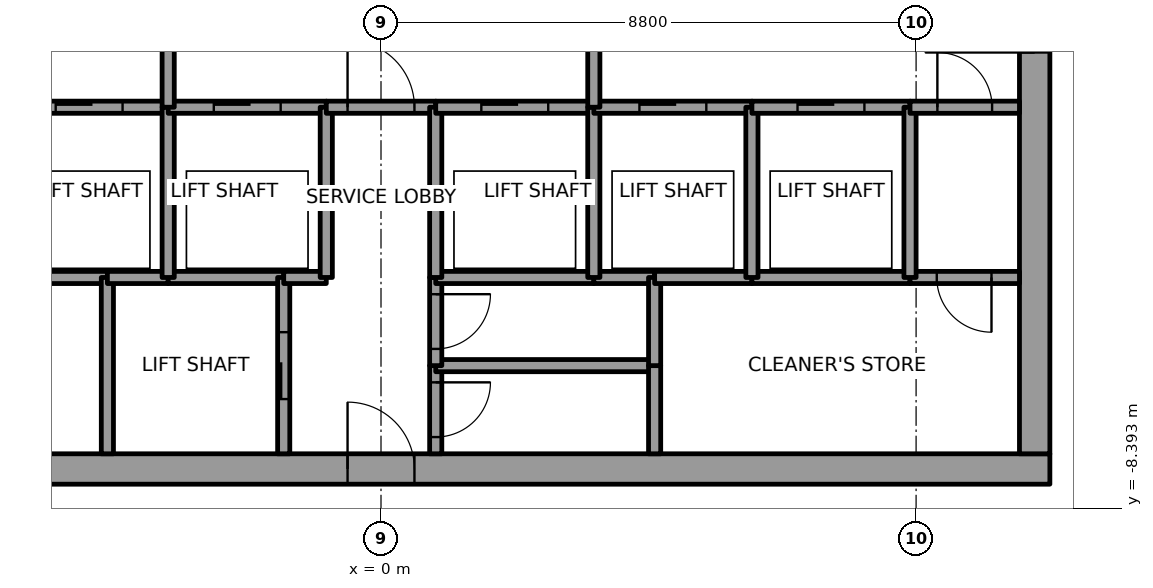
"""IFC4 building model, lengths in metres.
Left out: names, types, materials, properties, quantities, classifications, styles, units other than length and angle.
Written with IfcOpenShell. Run it as: python <this file> out.ifc"""

import sys

from ifc_helpers import new_model, si_unit, direction, frame, frame_2d, origin, place, context, subcontext, project, spatial, rectangle, extrude, element, fill, save


model = new_model("IFC4")
c1 = context("Model", 3, precision=1e-05, world=origin(), true_north=direction((0.0, 1.0)))
c2 = subcontext(c1, "Body", "Model", "MODEL_VIEW")
j1 = project(units=[si_unit("LENGTHUNIT", "METRE"), si_unit("PLANEANGLEUNIT", "RADIAN")], contexts=[c1])
p1 = place(None, origin())
s1 = spatial("IfcSite", under=j1, at=p1, CompositionType="ELEMENT")
p2 = place(p1, origin())
s2 = spatial("IfcBuilding", under=s1, at=p2, CompositionType="ELEMENT")
p3 = place(p2, frame((0.0, 0.0, 303.0)))
s3 = spatial("IfcBuildingStorey", under=s2, at=p3, CompositionType="ELEMENT", Elevation=303.0)
p4 = place(p3, frame((-11.0, -7.75, 0.0), z_axis=(0.0, 0.0, 1.0), x_axis=(1.0, 0.0, 0.0)))
e1 = element("IfcWall", 1, at=p4, inside=s3, PredefinedType="SHEAR", context=c2, shape_type="SweptSolid", body=[
    extrude(rectangle(XDim=22.0, YDim=0.5, at=frame_2d((11.0, 0.0))), origin(), (0.0, 0.0, 1.0), 4.0),
])
p5 = place(p4, frame((10.45, 0.0, 0.0)))
e2 = element("IfcOpeningElement", 2, at=p5, cuts=e1, PredefinedType="OPENING", context=c2, shape_type="SweptSolid", body=[
    extrude(rectangle(XDim=1.1, YDim=2.1, at=frame_2d((0.55, 1.05))), frame((0.0, 0.25, 0.0), z_axis=(0.0, -1.0, 0.0), x_axis=(1.0, 0.0, 0.0)), (0.0, 0.0, 1.0), 0.5),
])
p6 = place(p3, frame((10.75, -7.5, 0.0), z_axis=(0.0, 0.0, 1.0), x_axis=(0.0, 1.0, 0.0)))
e3 = element("IfcWall", 3, at=p6, inside=s3, PredefinedType="SHEAR", context=c2, shape_type="SweptSolid", body=[
    extrude(rectangle(XDim=15.0, YDim=0.5, at=frame_2d((7.5, 0.0))), origin(), (0.0, 0.0, 1.0), 4.0),
])
p7 = place(p6, frame((6.6, 0.0, 0.0)))
e4 = element("IfcOpeningElement", 4, at=p7, cuts=e3, PredefinedType="OPENING", context=c2, shape_type="SweptSolid", body=[
    extrude(rectangle(XDim=1.8, YDim=2.1, at=frame_2d((0.9, 1.05))), frame((0.0, 0.25, 0.0), z_axis=(0.0, -1.0, 0.0), x_axis=(1.0, 0.0, 0.0)), (0.0, 0.0, 1.0), 0.5),
])
p8 = place(p3, frame((-6.1, -4.6, 0.0), z_axis=(0.0, 0.0, 1.0), x_axis=(1.0, 0.0, 0.0)))
e5 = element("IfcWall", 5, at=p8, inside=s3, PredefinedType="SOLIDWALL", context=c2, shape_type="SweptSolid", body=[
    extrude(rectangle(XDim=1.6, YDim=0.2, at=frame_2d((0.8, 0.0))), origin(), (0.0, 0.0, 1.0), 3.85),
])
p9 = place(p3, frame((-6.1, -1.8, 0.0), z_axis=(0.0, 0.0, 1.0), x_axis=(1.0, 0.0, 0.0)))
e6 = element("IfcWall", 6, at=p9, inside=s3, PredefinedType="SOLIDWALL", context=c2, shape_type="SweptSolid", body=[
    extrude(rectangle(XDim=2.6, YDim=0.2, at=frame_2d((1.3, 0.0))), origin(), (0.0, 0.0, 1.0), 3.85),
])
p10 = place(p9, frame((0.75, 0.0, 0.0)))
e7 = element("IfcOpeningElement", 7, at=p10, cuts=e6, PredefinedType="OPENING", context=c2, shape_type="SweptSolid", body=[
    extrude(rectangle(XDim=1.1, YDim=2.1, at=frame_2d((0.55, 1.05))), frame((0.0, 0.1, 0.0), z_axis=(0.0, -1.0, 0.0), x_axis=(1.0, 0.0, 0.0)), (0.0, 0.0, 1.0), 0.2),
])
p11 = place(p3, frame((-4.5, -4.6, 0.0), z_axis=(0.0, 0.0, 1.0), x_axis=(0.0, -1.0, 0.0)))
e8 = element("IfcWall", 8, at=p11, inside=s3, PredefinedType="SOLIDWALL", context=c2, shape_type="SweptSolid", body=[
    extrude(rectangle(XDim=2.9, YDim=0.2, at=frame_2d((1.45, 0.0))), origin(), (0.0, 0.0, 1.0), 3.85),
])
p12 = place(p3, frame((-4.5, -4.6, 0.0), z_axis=(0.0, 0.0, 1.0), x_axis=(1.0, 0.0, 0.0)))
e9 = element("IfcWall", 9, at=p12, inside=s3, PredefinedType="SOLIDWALL", context=c2, shape_type="SweptSolid", body=[
    extrude(rectangle(XDim=1.0, YDim=0.2, at=frame_2d((0.5, 0.0))), origin(), (0.0, 0.0, 1.0), 3.85),
])
p13 = place(p3, frame((-3.5, -4.6, 0.0), z_axis=(0.0, 0.0, 1.0), x_axis=(1.0, 0.0, 0.0)))
e10 = element("IfcWall", 10, at=p13, inside=s3, PredefinedType="SOLIDWALL", context=c2, shape_type="SweptSolid", body=[
    extrude(rectangle(XDim=1.9, YDim=0.2, at=frame_2d((0.95, 0.0))), origin(), (0.0, 0.0, 1.0), 3.85),
])
p14 = place(p3, frame((-3.5, -4.6, 0.0), z_axis=(0.0, 0.0, 1.0), x_axis=(0.0, 1.0, 0.0)))
e11 = element("IfcWall", 11, at=p14, inside=s3, PredefinedType="SOLIDWALL", context=c2, shape_type="SweptSolid", body=[
    extrude(rectangle(XDim=2.8, YDim=0.2, at=frame_2d((1.4, 0.0))), origin(), (0.0, 0.0, 1.0), 3.85),
])
p15 = place(p3, frame((-3.5, -1.8, 0.0), z_axis=(0.0, 0.0, 1.0), x_axis=(1.0, 0.0, 0.0)))
e12 = element("IfcWall", 12, at=p15, inside=s3, PredefinedType="SOLIDWALL", context=c2, shape_type="SweptSolid", body=[
    extrude(rectangle(XDim=2.6, YDim=0.2, at=frame_2d((1.3, 0.0))), origin(), (0.0, 0.0, 1.0), 3.85),
])
p16 = place(p15, frame((0.75, 0.0, 0.0)))
e13 = element("IfcOpeningElement", 13, at=p16, cuts=e12, PredefinedType="OPENING", context=c2, shape_type="SweptSolid", body=[
    extrude(rectangle(XDim=1.1, YDim=2.1, at=frame_2d((0.55, 1.05))), frame((0.0, 0.1, 0.0), z_axis=(0.0, -1.0, 0.0), x_axis=(1.0, 0.0, 0.0)), (0.0, 0.0, 1.0), 0.2),
])
p17 = place(p3, frame((-3.5, 1.8, 0.0), z_axis=(0.0, 0.0, 1.0), x_axis=(0.0, -1.0, 0.0)))
e14 = element("IfcWall", 14, at=p17, inside=s3, PredefinedType="SOLIDWALL", context=c2, shape_type="SweptSolid", body=[
    extrude(rectangle(XDim=3.6, YDim=0.2, at=frame_2d((1.8, 0.0))), origin(), (0.0, 0.0, 1.0), 3.85),
])
p18 = place(p17, frame((1.05, 0.0, 0.0)))
e15 = element("IfcOpeningElement", 15, at=p18, cuts=e14, PredefinedType="OPENING", context=c2, shape_type="SweptSolid", body=[
    extrude(rectangle(XDim=1.5, YDim=2.1, at=frame_2d((0.75, 1.05))), frame((0.0, 0.1, 0.0), z_axis=(0.0, -1.0, 0.0), x_axis=(1.0, 0.0, 0.0)), (0.0, 0.0, 1.0), 0.2),
])
p19 = place(p3, frame((-1.6, -7.5, 0.0), z_axis=(0.0, 0.0, 1.0), x_axis=(0.0, 1.0, 0.0)))
e16 = element("IfcWall", 16, at=p19, inside=s3, PredefinedType="SOLIDWALL", context=c2, shape_type="SweptSolid", body=[
    extrude(rectangle(XDim=2.9, YDim=0.2, at=frame_2d((1.45, 0.0))), origin(), (0.0, 0.0, 1.0), 3.85),
])
p20 = place(p19, frame((0.9, 0.0, 0.0)))
e17 = element("IfcOpeningElement", 17, at=p20, cuts=e16, PredefinedType="OPENING", context=c2, shape_type="SweptSolid", body=[
    extrude(rectangle(XDim=1.1, YDim=2.1, at=frame_2d((0.55, 1.05))), frame((0.0, 0.1, 0.0), z_axis=(0.0, -1.0, 0.0), x_axis=(1.0, 0.0, 0.0)), (0.0, 0.0, 1.0), 0.2),
])
p21 = place(p3, frame((-1.6, -4.6, 0.0), z_axis=(0.0, 0.0, 1.0), x_axis=(1.0, 0.0, 0.0)))
e18 = element("IfcWall", 18, at=p21, inside=s3, PredefinedType="SOLIDWALL", context=c2, shape_type="SweptSolid", body=[
    extrude(rectangle(XDim=0.7, YDim=0.2, at=frame_2d((0.35, 0.0))), origin(), (0.0, 0.0, 1.0), 3.85),
])
p22 = place(p3, frame((-0.9, -4.6, 0.0), z_axis=(0.0, 0.0, 1.0), x_axis=(0.0, 1.0, 0.0)))
e19 = element("IfcWall", 19, at=p22, inside=s3, PredefinedType="SOLIDWALL", context=c2, shape_type="SweptSolid", body=[
    extrude(rectangle(XDim=2.8, YDim=0.2, at=frame_2d((1.4, 0.0))), origin(), (0.0, 0.0, 1.0), 3.85),
])
p23 = place(p3, frame((-0.9, -1.8, 0.0), z_axis=(0.0, 0.0, 1.0), x_axis=(1.0, 0.0, 0.0)))
e20 = element("IfcWall", 20, at=p23, inside=s3, PredefinedType="SOLIDWALL", context=c2, shape_type="SweptSolid", body=[
    extrude(rectangle(XDim=1.8, YDim=0.2, at=frame_2d((0.9, 0.0))), origin(), (0.0, 0.0, 1.0), 3.85),
])
p24 = place(p23, frame((0.35, 0.0, 0.0)))
e21 = element("IfcOpeningElement", 21, at=p24, cuts=e20, PredefinedType="OPENING", context=c2, shape_type="SweptSolid", body=[
    extrude(rectangle(XDim=1.1, YDim=2.1, at=frame_2d((0.55, 1.05))), frame((0.0, 0.1, 0.0), z_axis=(0.0, -1.0, 0.0), x_axis=(1.0, 0.0, 0.0)), (0.0, 0.0, 1.0), 0.2),
])
p25 = place(p3, frame((0.9, -6.05, 0.0), z_axis=(0.0, 0.0, 1.0), x_axis=(0.0, -1.0, 0.0)))
e22 = element("IfcWall", 22, at=p25, inside=s3, PredefinedType="SOLIDWALL", context=c2, shape_type="SweptSolid", body=[
    extrude(rectangle(XDim=1.45, YDim=0.2, at=frame_2d((0.725, 0.0))), origin(), (0.0, 0.0, 1.0), 3.85),
])
p26 = place(p25, frame((0.275, 0.0, 0.0)))
e23 = element("IfcOpeningElement", 23, at=p26, cuts=e22, PredefinedType="OPENING", context=c2, shape_type="SweptSolid", body=[
    extrude(rectangle(XDim=0.9, YDim=2.1, at=frame_2d((0.45, 1.05))), frame((0.0, 0.1, 0.0), z_axis=(0.0, -1.0, 0.0), x_axis=(1.0, 0.0, 0.0)), (0.0, 0.0, 1.0), 0.2),
])
p27 = place(p3, frame((4.5, -6.05, 0.0), z_axis=(0.0, 0.0, 1.0), x_axis=(-1.0, 0.0, 0.0)))
e24 = element("IfcWall", 24, at=p27, inside=s3, PredefinedType="SOLIDWALL", context=c2, shape_type="SweptSolid", body=[
    extrude(rectangle(XDim=3.6, YDim=0.2, at=frame_2d((1.8, 0.0))), origin(), (0.0, 0.0, 1.0), 3.85),
])
p28 = place(p3, frame((0.9, -4.6, 0.0), z_axis=(0.0, 0.0, 1.0), x_axis=(0.0, -1.0, 0.0)))
e25 = element("IfcWall", 25, at=p28, inside=s3, PredefinedType="SOLIDWALL", context=c2, shape_type="SweptSolid", body=[
    extrude(rectangle(XDim=1.45, YDim=0.2, at=frame_2d((0.725, 0.0))), origin(), (0.0, 0.0, 1.0), 3.85),
])
p29 = place(p28, frame((0.275, 0.0, 0.0)))
e26 = element("IfcOpeningElement", 26, at=p29, cuts=e25, PredefinedType="OPENING", context=c2, shape_type="SweptSolid", body=[
    extrude(rectangle(XDim=0.9, YDim=2.1, at=frame_2d((0.45, 1.05))), frame((0.0, 0.1, 0.0), z_axis=(0.0, -1.0, 0.0), x_axis=(1.0, 0.0, 0.0)), (0.0, 0.0, 1.0), 0.2),
])
p30 = place(p3, frame((3.5, -4.6, 0.0), z_axis=(0.0, 0.0, 1.0), x_axis=(-1.0, 0.0, 0.0)))
e27 = element("IfcWall", 27, at=p30, inside=s3, PredefinedType="SOLIDWALL", context=c2, shape_type="SweptSolid", body=[
    extrude(rectangle(XDim=2.6, YDim=0.2, at=frame_2d((1.3, 0.0))), origin(), (0.0, 0.0, 1.0), 3.85),
])
p31 = place(p3, frame((0.9, -1.8, 0.0), z_axis=(0.0, 0.0, 1.0), x_axis=(0.0, -1.0, 0.0)))
e28 = element("IfcWall", 28, at=p31, inside=s3, PredefinedType="SOLIDWALL", context=c2, shape_type="SweptSolid", body=[
    extrude(rectangle(XDim=2.8, YDim=0.2, at=frame_2d((1.4, 0.0))), origin(), (0.0, 0.0, 1.0), 3.85),
])
p32 = place(p3, frame((0.9, -1.8, 0.0), z_axis=(0.0, 0.0, 1.0), x_axis=(1.0, 0.0, 0.0)))
e29 = element("IfcWall", 29, at=p32, inside=s3, PredefinedType="SOLIDWALL", context=c2, shape_type="SweptSolid", body=[
    extrude(rectangle(XDim=2.6, YDim=0.2, at=frame_2d((1.3, 0.0))), origin(), (0.0, 0.0, 1.0), 3.85),
])
p33 = place(p32, frame((0.75, 0.0, 0.0)))
e30 = element("IfcOpeningElement", 30, at=p33, cuts=e29, PredefinedType="OPENING", context=c2, shape_type="SweptSolid", body=[
    extrude(rectangle(XDim=1.1, YDim=2.1, at=frame_2d((0.55, 1.05))), frame((0.0, 0.1, 0.0), z_axis=(0.0, -1.0, 0.0), x_axis=(1.0, 0.0, 0.0)), (0.0, 0.0, 1.0), 0.2),
])
p34 = place(p3, frame((4.5, -4.6, 0.0), z_axis=(0.0, 0.0, 1.0), x_axis=(-1.0, 0.0, 0.0)))
e31 = element("IfcWall", 31, at=p34, inside=s3, PredefinedType="SOLIDWALL", context=c2, shape_type="SweptSolid", body=[
    extrude(rectangle(XDim=1.0, YDim=0.2, at=frame_2d((0.5, 0.0))), origin(), (0.0, 0.0, 1.0), 3.85),
])
p35 = place(p3, frame((3.5, -4.6, 0.0), z_axis=(0.0, 0.0, 1.0), x_axis=(0.0, 1.0, 0.0)))
e32 = element("IfcWall", 32, at=p35, inside=s3, PredefinedType="SOLIDWALL", context=c2, shape_type="SweptSolid", body=[
    extrude(rectangle(XDim=2.8, YDim=0.2, at=frame_2d((1.4, 0.0))), origin(), (0.0, 0.0, 1.0), 3.85),
])
p36 = place(p3, frame((3.5, -1.8, 0.0), z_axis=(0.0, 0.0, 1.0), x_axis=(1.0, 0.0, 0.0)))
e33 = element("IfcWall", 33, at=p36, inside=s3, PredefinedType="SOLIDWALL", context=c2, shape_type="SweptSolid", body=[
    extrude(rectangle(XDim=2.6, YDim=0.2, at=frame_2d((1.3, 0.0))), origin(), (0.0, 0.0, 1.0), 3.85),
])
p37 = place(p36, frame((0.75, 0.0, 0.0)))
e34 = element("IfcOpeningElement", 34, at=p37, cuts=e33, PredefinedType="OPENING", context=c2, shape_type="SweptSolid", body=[
    extrude(rectangle(XDim=1.1, YDim=2.1, at=frame_2d((0.55, 1.05))), frame((0.0, 0.1, 0.0), z_axis=(0.0, -1.0, 0.0), x_axis=(1.0, 0.0, 0.0)), (0.0, 0.0, 1.0), 0.2),
])
p38 = place(p3, frame((3.5, -1.8, 0.0), z_axis=(0.0, 0.0, 1.0), x_axis=(0.0, 1.0, 0.0)))
e35 = element("IfcWall", 35, at=p38, inside=s3, PredefinedType="SOLIDWALL", context=c2, shape_type="SweptSolid", body=[
    extrude(rectangle(XDim=3.6, YDim=0.2, at=frame_2d((1.8, 0.0))), origin(), (0.0, 0.0, 1.0), 3.85),
])
p39 = place(p38, frame((1.05, 0.0, 0.0)))
e36 = element("IfcOpeningElement", 36, at=p39, cuts=e35, PredefinedType="OPENING", context=c2, shape_type="SweptSolid", body=[
    extrude(rectangle(XDim=1.5, YDim=2.1, at=frame_2d((0.75, 1.05))), frame((0.0, 0.1, 0.0), z_axis=(0.0, -1.0, 0.0), x_axis=(1.0, 0.0, 0.0)), (0.0, 0.0, 1.0), 0.2),
])
for number, where, z_axis, x_axis in (
    (37, (4.5, -6.05, 0.0), (0.0, 0.0, 1.0), (0.0, -1.0, 0.0)),
    (38, (4.5, -4.6, 0.0), (0.0, 0.0, 1.0), (0.0, -1.0, 0.0)),
):
    element("IfcWall", number, at=place(p3, frame(where, z_axis=z_axis, x_axis=x_axis)), inside=s3, PredefinedType="SOLIDWALL", context=c2, shape_type="SweptSolid", body=[
        extrude(rectangle(XDim=1.45, YDim=0.2, at=frame_2d((0.725, 0.0))), origin(), (0.0, 0.0, 1.0), 3.85),
    ])
p40 = place(p3, frame((6.1, -4.6, 0.0), z_axis=(0.0, 0.0, 1.0), x_axis=(-1.0, 0.0, 0.0)))
e39 = element("IfcWall", 39, at=p40, inside=s3, PredefinedType="SOLIDWALL", context=c2, shape_type="SweptSolid", body=[
    extrude(rectangle(XDim=1.6, YDim=0.2, at=frame_2d((0.8, 0.0))), origin(), (0.0, 0.0, 1.0), 3.85),
])
p41 = place(p3, frame((8.7, -4.6, 0.0), z_axis=(0.0, 0.0, 1.0), x_axis=(-1.0, 0.0, 0.0)))
e40 = element("IfcWall", 40, at=p41, inside=s3, PredefinedType="SOLIDWALL", context=c2, shape_type="SweptSolid", body=[
    extrude(rectangle(XDim=2.6, YDim=0.2, at=frame_2d((1.3, 0.0))), origin(), (0.0, 0.0, 1.0), 3.85),
])
p42 = place(p3, frame((6.1, -4.6, 0.0), z_axis=(0.0, 0.0, 1.0), x_axis=(0.0, 1.0, 0.0)))
e41 = element("IfcWall", 41, at=p42, inside=s3, PredefinedType="SOLIDWALL", context=c2, shape_type="SweptSolid", body=[
    extrude(rectangle(XDim=2.8, YDim=0.2, at=frame_2d((1.4, 0.0))), origin(), (0.0, 0.0, 1.0), 3.85),
])
p43 = place(p3, frame((6.1, -1.8, 0.0), z_axis=(0.0, 0.0, 1.0), x_axis=(1.0, 0.0, 0.0)))
e42 = element("IfcWall", 42, at=p43, inside=s3, PredefinedType="SOLIDWALL", context=c2, shape_type="SweptSolid", body=[
    extrude(rectangle(XDim=2.6, YDim=0.2, at=frame_2d((1.3, 0.0))), origin(), (0.0, 0.0, 1.0), 3.85),
])
p44 = place(p43, frame((0.75, 0.0, 0.0)))
e43 = element("IfcOpeningElement", 43, at=p44, cuts=e42, PredefinedType="OPENING", context=c2, shape_type="SweptSolid", body=[
    extrude(rectangle(XDim=1.1, YDim=2.1, at=frame_2d((0.55, 1.05))), frame((0.0, 0.1, 0.0), z_axis=(0.0, -1.0, 0.0), x_axis=(1.0, 0.0, 0.0)), (0.0, 0.0, 1.0), 0.2),
])
p45 = place(p3, frame((10.5, -4.6, 0.0), z_axis=(0.0, 0.0, 1.0), x_axis=(-1.0, 0.0, 0.0)))
e44 = element("IfcWall", 44, at=p45, inside=s3, PredefinedType="SOLIDWALL", context=c2, shape_type="SweptSolid", body=[
    extrude(rectangle(XDim=1.8, YDim=0.2, at=frame_2d((0.9, 0.0))), origin(), (0.0, 0.0, 1.0), 3.85),
])
p46 = place(p45, frame((0.46, 0.0, 0.0)))
e45 = element("IfcOpeningElement", 45, at=p46, cuts=e44, PredefinedType="OPENING", context=c2, shape_type="SweptSolid", body=[
    extrude(rectangle(XDim=0.9, YDim=2.1, at=frame_2d((0.45, 1.05))), frame((0.0, 0.1, 0.0), z_axis=(0.0, -1.0, 0.0), x_axis=(1.0, 0.0, 0.0)), (0.0, 0.0, 1.0), 0.2),
])
p47 = place(p3, frame((8.7, -1.8, 0.0), z_axis=(0.0, 0.0, 1.0), x_axis=(0.0, -1.0, 0.0)))
e46 = element("IfcWall", 46, at=p47, inside=s3, PredefinedType="SOLIDWALL", context=c2, shape_type="SweptSolid", body=[
    extrude(rectangle(XDim=2.8, YDim=0.2, at=frame_2d((1.4, 0.0))), origin(), (0.0, 0.0, 1.0), 3.85),
])
p48 = place(p3, frame((8.7, -1.8, 0.0), z_axis=(0.0, 0.0, 1.0), x_axis=(1.0, 0.0, 0.0)))
e47 = element("IfcWall", 47, at=p48, inside=s3, PredefinedType="SOLIDWALL", context=c2, shape_type="SweptSolid", body=[
    extrude(rectangle(XDim=1.8, YDim=0.2, at=frame_2d((0.9, 0.0))), origin(), (0.0, 0.0, 1.0), 3.85),
])
p49 = place(p48, frame((0.45, 0.0, 0.0)))
e48 = element("IfcOpeningElement", 48, at=p49, cuts=e47, PredefinedType="OPENING", context=c2, shape_type="SweptSolid", body=[
    extrude(rectangle(XDim=0.9, YDim=2.1, at=frame_2d((0.45, 1.05))), frame((0.0, 0.1, 0.0), z_axis=(0.0, -1.0, 0.0), x_axis=(1.0, 0.0, 0.0)), (0.0, 0.0, 1.0), 0.2),
])
p50 = place(p10, origin())
e49 = element("IfcDoor", 49, at=p50, inside=s3, OperationType="SLIDING_TO_RIGHT", PredefinedType="DOOR", context=c2, shape_type="SweptSolid", body=[
    extrude(rectangle(XDim=1.1, YDim=2.1, at=frame_2d((0.55, 1.05))), frame((0.0, 0.025, 0.0), z_axis=(0.0, -1.0, 0.0), x_axis=(1.0, 0.0, 0.0)), (0.0, 0.0, 1.0), 0.05),
])
fill(e7, e49)
p51 = place(p16, origin())
e50 = element("IfcDoor", 50, at=p51, inside=s3, OperationType="SLIDING_TO_LEFT", PredefinedType="DOOR", context=c2, shape_type="SweptSolid", body=[
    extrude(rectangle(XDim=1.1, YDim=2.1, at=frame_2d((0.55, 1.05))), frame((0.0, 0.025, 0.0), z_axis=(0.0, -1.0, 0.0), x_axis=(1.0, 0.0, 0.0)), (0.0, 0.0, 1.0), 0.05),
])
fill(e13, e50)
p52 = place(p33, origin())
e51 = element("IfcDoor", 51, at=p52, inside=s3, OperationType="SLIDING_TO_RIGHT", PredefinedType="DOOR", context=c2, shape_type="SweptSolid", body=[
    extrude(rectangle(XDim=1.1, YDim=2.1, at=frame_2d((0.55, 1.05))), frame((0.0, 0.025, 0.0), z_axis=(0.0, -1.0, 0.0), x_axis=(1.0, 0.0, 0.0)), (0.0, 0.0, 1.0), 0.05),
])
fill(e30, e51)
p53 = place(p37, origin())
e52 = element("IfcDoor", 52, at=p53, inside=s3, OperationType="SLIDING_TO_RIGHT", PredefinedType="DOOR", context=c2, shape_type="SweptSolid", body=[
    extrude(rectangle(XDim=1.1, YDim=2.1, at=frame_2d((0.55, 1.05))), frame((0.0, 0.025, 0.0), z_axis=(0.0, -1.0, 0.0), x_axis=(1.0, 0.0, 0.0)), (0.0, 0.0, 1.0), 0.05),
])
fill(e34, e52)
p54 = place(p44, origin())
e53 = element("IfcDoor", 53, at=p54, inside=s3, OperationType="SLIDING_TO_LEFT", PredefinedType="DOOR", context=c2, shape_type="SweptSolid", body=[
    extrude(rectangle(XDim=1.1, YDim=2.1, at=frame_2d((0.55, 1.05))), frame((0.0, 0.025, 0.0), z_axis=(0.0, -1.0, 0.0), x_axis=(1.0, 0.0, 0.0)), (0.0, 0.0, 1.0), 0.05),
])
fill(e43, e53)
p55 = place(p20, origin())
e54 = element("IfcDoor", 54, at=p55, inside=s3, OperationType="SLIDING_TO_LEFT", PredefinedType="DOOR", context=c2, shape_type="SweptSolid", body=[
    extrude(rectangle(XDim=1.1, YDim=2.1, at=frame_2d((0.55, 1.05))), frame((0.0, 0.025, 0.0), z_axis=(0.0, -1.0, 0.0), x_axis=(1.0, 0.0, 0.0)), (0.0, 0.0, 1.0), 0.05),
])
fill(e17, e54)
p56 = place(p24, origin())
e55 = element("IfcDoor", 55, at=p56, inside=s3, OperationType="SINGLE_SWING_LEFT", PredefinedType="DOOR", context=c2, shape_type="SweptSolid", body=[
    extrude(rectangle(XDim=1.1, YDim=2.1, at=frame_2d((0.55, 1.05))), frame((0.0, 0.025, 0.0), z_axis=(0.0, -1.0, 0.0), x_axis=(1.0, 0.0, 0.0)), (0.0, 0.0, 1.0), 0.05),
])
fill(e21, e55)
p57 = place(p46, origin())
e56 = element("IfcDoor", 56, at=p57, inside=s3, OperationType="SINGLE_SWING_LEFT", PredefinedType="DOOR", context=c2, shape_type="SweptSolid", body=[
    extrude(rectangle(XDim=0.9, YDim=2.1, at=frame_2d((0.45, 1.05))), frame((0.0, 0.025, 0.0), z_axis=(0.0, -1.0, 0.0), x_axis=(1.0, 0.0, 0.0)), (0.0, 0.0, 1.0), 0.05),
])
fill(e45, e56)
p58 = place(p49, origin())
e57 = element("IfcDoor", 57, at=p58, inside=s3, OperationType="SINGLE_SWING_RIGHT", PredefinedType="DOOR", context=c2, shape_type="SweptSolid", body=[
    extrude(rectangle(XDim=0.9, YDim=2.1, at=frame_2d((0.45, 1.05))), frame((0.0, 0.025, 0.0), z_axis=(0.0, -1.0, 0.0), x_axis=(1.0, 0.0, 0.0)), (0.0, 0.0, 1.0), 0.05),
])
fill(e48, e57)
p59 = place(p26, origin())
e58 = element("IfcDoor", 58, at=p59, inside=s3, OperationType="SINGLE_SWING_RIGHT", PredefinedType="DOOR", context=c2, shape_type="SweptSolid", body=[
    extrude(rectangle(XDim=0.9, YDim=2.1, at=frame_2d((0.45, 1.05))), frame((0.0, 0.025, 0.0), z_axis=(0.0, -1.0, 0.0), x_axis=(1.0, 0.0, 0.0)), (0.0, 0.0, 1.0), 0.05),
])
fill(e23, e58)
p60 = place(p29, origin())
e59 = element("IfcDoor", 59, at=p60, inside=s3, OperationType="SINGLE_SWING_LEFT", PredefinedType="DOOR", context=c2, shape_type="SweptSolid", body=[
    extrude(rectangle(XDim=0.9, YDim=2.1, at=frame_2d((0.45, 1.05))), frame((0.0, 0.025, 0.0), z_axis=(0.0, -1.0, 0.0), x_axis=(1.0, 0.0, 0.0)), (0.0, 0.0, 1.0), 0.05),
])
fill(e26, e59)
p61 = place(p7, origin())
e60 = element("IfcDoor", 60, at=p61, inside=s3, OperationType="DOUBLE_DOOR_SINGLE_SWING", PredefinedType="DOOR", context=c2, shape_type="SweptSolid", body=[
    extrude(rectangle(XDim=1.8, YDim=2.1, at=frame_2d((0.9, 1.05))), frame((0.0, 0.025, 0.0), z_axis=(0.0, -1.0, 0.0), x_axis=(1.0, 0.0, 0.0)), (0.0, 0.0, 1.0), 0.05),
])
fill(e4, e60)
p62 = place(p5, origin())
e61 = element("IfcDoor", 61, at=p62, inside=s3, OperationType="SINGLE_SWING_RIGHT", PredefinedType="DOOR", context=c2, shape_type="SweptSolid", body=[
    extrude(rectangle(XDim=1.1, YDim=2.1, at=frame_2d((0.55, 1.05))), frame((0.0, 0.025, 0.0), z_axis=(0.0, -1.0, 0.0), x_axis=(1.0, 0.0, 0.0)), (0.0, 0.0, 1.0), 0.05),
])
fill(e2, e61)
save(model, sys.argv[1])
